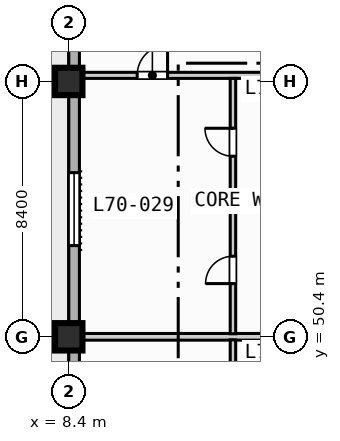
"""IFC4 building model, lengths in metres.
Left out: names, types, materials, properties, quantities, classifications, styles, units other than length and angle.
Written with IfcOpenShell. Run it as: python <this file> out.ifc"""

import sys

from ifc_helpers import new_model, si_unit, direction, frame, frame_2d, origin, origin_2d, place, context, subcontext, project, spatial, rectangle, extrude, element, fill, save


model = new_model("IFC4")
c1 = context("Model", 3, precision=1e-05, world=origin(), true_north=direction((0.0, 1.0)))
c2 = subcontext(c1, "Body", "Model", "MODEL_VIEW")
j1 = project(units=[si_unit("LENGTHUNIT", "METRE"), si_unit("PLANEANGLEUNIT", "RADIAN")], contexts=[c1])
p1 = place(None, origin())
s1 = spatial("IfcSite", under=j1, at=p1, CompositionType="ELEMENT")
p2 = place(p1, origin())
s2 = spatial("IfcBuilding", under=s1, at=p2, CompositionType="ELEMENT")
p3 = place(p2, frame((0.0, 0.0, 282.3)))
s3 = spatial("IfcBuildingStorey", under=s2, at=p3, CompositionType="ELEMENT", Elevation=282.3)
for number, where, z_axis, x_axis in (
    (1, (8.4, 50.4, 0.0), (0.0, 0.0, 1.0), (1.0, 0.0, 0.0)),
    (2, (8.4, 58.8, 0.0), (0.0, 0.0, 1.0), (1.0, 0.0, 0.0)),
):
    element("IfcColumn", number, at=place(p3, frame(where, z_axis=z_axis, x_axis=x_axis)), inside=s3, PredefinedType="COLUMN", context=c2, shape_type="SweptSolid", body=[
        extrude(rectangle(XDim=0.9, YDim=0.9, at=origin_2d()), origin(), (0.0, 0.0, 1.0), 3.7),
    ])
p4 = place(p3, frame((8.575, 11.575, 0.0), z_axis=(0.0, 0.0, 1.0), x_axis=(0.0, 1.0, 0.0)))
e3 = element("IfcWall", 3, at=p4, inside=s3, PredefinedType="STANDARD", context=c2, shape_type="SweptSolid", body=[
    extrude(rectangle(XDim=60.85, YDim=0.35, at=frame_2d((30.425, 0.0))), origin(), (0.0, 0.0, 1.0), 3.47),
])
p5 = place(p4, frame((33.925, 0.0, 0.0)))
e4 = element("IfcOpeningElement", 4, at=p5, cuts=e3, PredefinedType="OPENING", context=c2, shape_type="SweptSolid", body=[
    extrude(rectangle(XDim=1.4, YDim=2.2, at=frame_2d((0.7, 1.1))), frame((0.0, 0.185, 0.0), z_axis=(0.0, -1.0, 0.0), x_axis=(1.0, 0.0, 0.0)), (0.0, 0.0, 1.0), 0.37),
])
p6 = place(p4, frame((16.925, 0.0, 0.85)))
e5 = element("IfcOpeningElement", 5, at=p6, cuts=e3, PredefinedType="OPENING", context=c2, shape_type="SweptSolid", body=[
    extrude(rectangle(XDim=1.8, YDim=1.8, at=frame_2d((0.9, 0.9))), frame((0.0, 0.185, 0.0), z_axis=(0.0, -1.0, 0.0), x_axis=(1.0, 0.0, 0.0)), (0.0, 0.0, 1.0), 0.37),
])
p7 = place(p4, frame((25.025, 0.0, 0.85)))
e6 = element("IfcOpeningElement", 6, at=p7, cuts=e3, PredefinedType="OPENING", context=c2, shape_type="SweptSolid", body=[
    extrude(rectangle(XDim=2.4, YDim=1.95, at=frame_2d((1.2, 0.975))), frame((0.0, 0.185, 0.0), z_axis=(0.0, -1.0, 0.0), x_axis=(1.0, 0.0, 0.0)), (0.0, 0.0, 1.0), 0.37),
])
p8 = place(p4, frame((41.825, 0.0, 0.85)))
e7 = element("IfcOpeningElement", 7, at=p8, cuts=e3, PredefinedType="OPENING", context=c2, shape_type="SweptSolid", body=[
    extrude(rectangle(XDim=2.4, YDim=1.95, at=frame_2d((1.2, 0.975))), frame((0.0, 0.185, 0.0), z_axis=(0.0, -1.0, 0.0), x_axis=(1.0, 0.0, 0.0)), (0.0, 0.0, 1.0), 0.37),
])
p9 = place(p3, frame((8.65, 59.0, 0.0), z_axis=(0.0, 0.0, 1.0), x_axis=(1.0, 0.0, 0.0)))
e8 = element("IfcWall", 8, at=p9, inside=s3, PredefinedType="PARTITIONING", context=c2, shape_type="SweptSolid", body=[
    extrude(rectangle(XDim=7.95, YDim=0.2, at=frame_2d((3.975, 0.0))), origin(), (0.0, 0.0, 1.0), 2.87),
])
p10 = place(p9, frame((2.0, 0.0, 0.0)))
e9 = element("IfcOpeningElement", 9, at=p10, cuts=e8, PredefinedType="OPENING", context=c2, shape_type="SweptSolid", body=[
    extrude(rectangle(XDim=1.0, YDim=2.15, at=frame_2d((0.5, 1.075))), frame((0.0, 0.11, 0.0), z_axis=(0.0, -1.0, 0.0), x_axis=(1.0, 0.0, 0.0)), (0.0, 0.0, 1.0), 0.22),
])
p11 = place(p3, frame((8.65, 50.4, 0.0), z_axis=(0.0, 0.0, 1.0), x_axis=(1.0, 0.0, 0.0)))
e10 = element("IfcWall", 10, at=p11, inside=s3, PredefinedType="PARTITIONING", context=c2, shape_type="SweptSolid", body=[
    extrude(rectangle(XDim=7.95, YDim=0.22, at=frame_2d((3.975, 0.0))), origin(), (0.0, 0.0, 1.0), 3.16),
])
p12 = place(p3, frame((13.8, 41.7, 0.0), z_axis=(0.0, 0.0, 1.0), x_axis=(0.0, 1.0, 0.0)))
e11 = element("IfcWall", 11, at=p12, inside=s3, PredefinedType="PLUMBINGWALL", context=c2, shape_type="SweptSolid", body=[
    extrude(rectangle(XDim=8.6, YDim=0.18, at=frame_2d((4.3, 0.0))), origin(), (0.0, 0.0, 1.0), 3.47),
])
p13 = place(p12, frame((1.7, 0.0, 0.0)))
e12 = element("IfcOpeningElement", 12, at=p13, cuts=e11, PredefinedType="OPENING", context=c2, shape_type="SweptSolid", body=[
    extrude(rectangle(XDim=0.9, YDim=2.1, at=frame_2d((0.45, 1.05))), frame((0.0, 0.1, 0.0), z_axis=(0.0, -1.0, 0.0), x_axis=(1.0, 0.0, 0.0)), (0.0, 0.0, 1.0), 0.2),
])
p14 = place(p12, frame((5.99, 0.0, 0.0)))
e13 = element("IfcOpeningElement", 13, at=p14, cuts=e11, PredefinedType="OPENING", context=c2, shape_type="SweptSolid", body=[
    extrude(rectangle(XDim=0.92, YDim=2.1, at=frame_2d((0.46, 1.05))), frame((0.0, 0.1, 0.0), z_axis=(0.0, -1.0, 0.0), x_axis=(1.0, 0.0, 0.0)), (0.0, 0.0, 1.0), 0.2),
])
p15 = place(p3, frame((13.8, 50.5, 0.0), z_axis=(0.0, 0.0, 1.0), x_axis=(0.0, 1.0, 0.0)))
e14 = element("IfcWall", 14, at=p15, inside=s3, PredefinedType="PLUMBINGWALL", context=c2, shape_type="SweptSolid", body=[
    extrude(rectangle(XDim=8.4, YDim=0.18, at=frame_2d((4.2, 0.0))), origin(), (0.0, 0.0, 1.0), 3.47),
])
p16 = place(p15, frame((1.65, 0.0, 0.0)))
e15 = element("IfcOpeningElement", 15, at=p16, cuts=e14, PredefinedType="OPENING", context=c2, shape_type="SweptSolid", body=[
    extrude(rectangle(XDim=0.9, YDim=2.1, at=frame_2d((0.45, 1.05))), frame((0.0, 0.1, 0.0), z_axis=(0.0, -1.0, 0.0), x_axis=(1.0, 0.0, 0.0)), (0.0, 0.0, 1.0), 0.2),
])
p17 = place(p15, frame((5.84, 0.0, 0.0)))
e16 = element("IfcOpeningElement", 16, at=p17, cuts=e14, PredefinedType="OPENING", context=c2, shape_type="SweptSolid", body=[
    extrude(rectangle(XDim=0.92, YDim=2.1, at=frame_2d((0.46, 1.05))), frame((0.0, 0.1, 0.0), z_axis=(0.0, -1.0, 0.0), x_axis=(1.0, 0.0, 0.0)), (0.0, 0.0, 1.0), 0.2),
])
p18 = place(p3, frame((13.8, 54.7, 0.0), z_axis=(0.0, 0.0, 1.0), x_axis=(1.0, 0.0, 0.0)))
e17 = element("IfcWall", 17, at=p18, inside=s3, PredefinedType="PLUMBINGWALL", context=c2, shape_type="SweptSolid", body=[
    extrude(rectangle(XDim=2.8, YDim=0.18, at=frame_2d((1.4, 0.0))), origin(), (0.0, 0.0, 1.0), 3.47),
])
p19 = place(p8, origin())
e18 = element("IfcWindow", 18, at=p19, inside=s3, PartitioningType="SINGLE_PANEL", PredefinedType="WINDOW", context=c2, shape_type="SweptSolid", body=[
    extrude(rectangle(XDim=2.4, YDim=1.95, at=frame_2d((1.2, 0.975))), frame((0.0, 0.03, 0.0), z_axis=(0.0, -1.0, 0.0), x_axis=(1.0, 0.0, 0.0)), (0.0, 0.0, 1.0), 0.06),
])
fill(e7, e18)
p20 = place(p10, origin())
e19 = element("IfcDoor", 19, at=p20, inside=s3, OperationType="SINGLE_SWING_RIGHT", PredefinedType="DOOR", context=c2, shape_type="SweptSolid", body=[
    extrude(rectangle(XDim=1.0, YDim=2.15, at=frame_2d((0.5, 1.075))), frame((0.0, 0.025, 0.0), z_axis=(0.0, -1.0, 0.0), x_axis=(1.0, 0.0, 0.0)), (0.0, 0.0, 1.0), 0.05),
])
fill(e9, e19)
p21 = place(p16, origin())
e20 = element("IfcDoor", 20, at=p21, inside=s3, OperationType="SINGLE_SWING_LEFT", PredefinedType="DOOR", context=c2, shape_type="SweptSolid", body=[
    extrude(rectangle(XDim=0.9, YDim=2.1, at=frame_2d((0.45, 1.05))), frame((0.0, 0.025, 0.0), z_axis=(0.0, -1.0, 0.0), x_axis=(1.0, 0.0, 0.0)), (0.0, 0.0, 1.0), 0.05),
])
fill(e15, e20)
p22 = place(p17, origin())
e21 = element("IfcDoor", 21, at=p22, inside=s3, OperationType="SINGLE_SWING_RIGHT", PredefinedType="DOOR", context=c2, shape_type="SweptSolid", body=[
    extrude(rectangle(XDim=0.92, YDim=2.1, at=frame_2d((0.46, 1.05))), frame((0.0, 0.025, 0.0), z_axis=(0.0, -1.0, 0.0), x_axis=(1.0, 0.0, 0.0)), (0.0, 0.0, 1.0), 0.05),
])
fill(e16, e21)
save(model, sys.argv[1])
